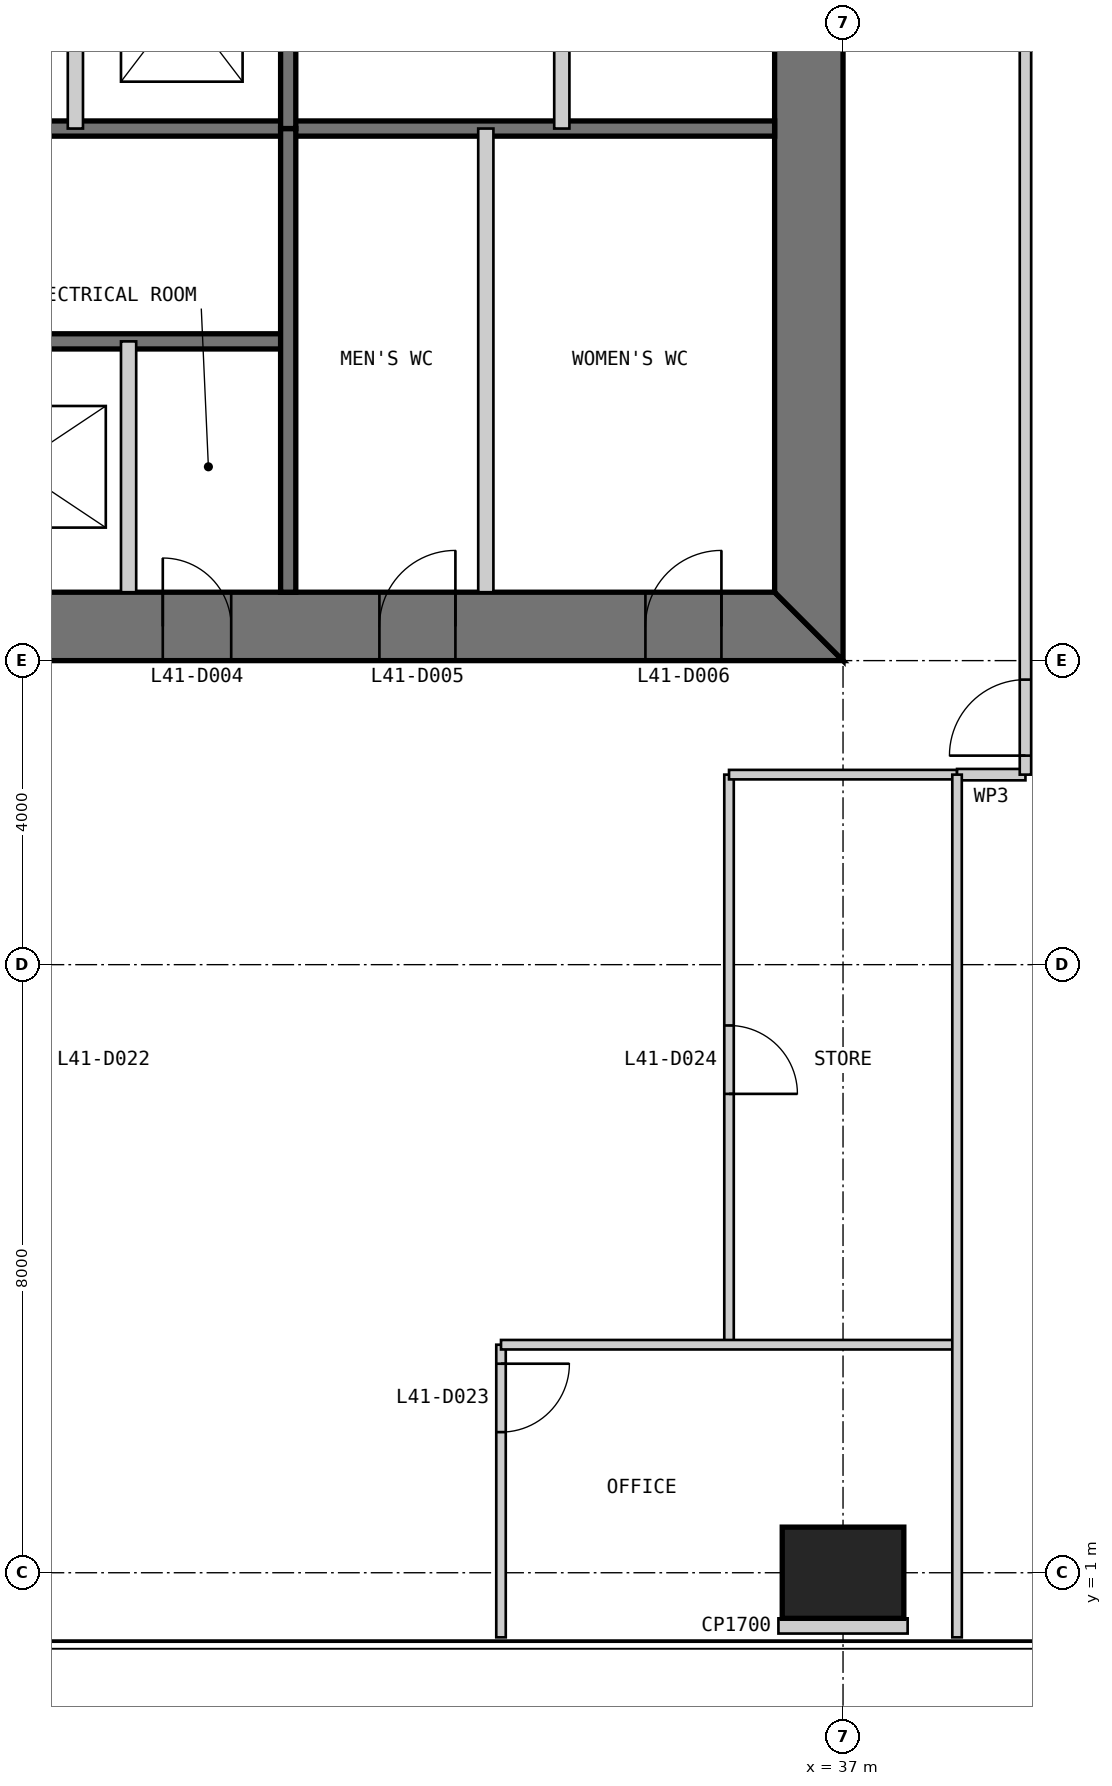
"""IFC4 building model, lengths in metres.
Left out: names, types, materials, properties, quantities, classifications, styles, units other than length and angle.
Written with IfcOpenShell. Run it as: python <this file> out.ifc"""

import sys

from ifc_helpers import new_model, si_unit, direction, frame, frame_2d, origin, origin_2d, place, context, subcontext, project, spatial, polyline, rectangle, outline, extrude, element, fill, save


model = new_model("IFC4")
c1 = context("Model", 3, precision=1e-05, world=origin(), true_north=direction((0.0, 1.0)))
c2 = subcontext(c1, "Body", "Model", "MODEL_VIEW")
j1 = project(units=[si_unit("LENGTHUNIT", "METRE"), si_unit("PLANEANGLEUNIT", "RADIAN")], contexts=[c1])
p1 = place(None, origin())
s1 = spatial("IfcSite", under=j1, at=p1, CompositionType="ELEMENT")
p2 = place(p1, origin())
s2 = spatial("IfcBuilding", under=s1, at=p2, CompositionType="ELEMENT")
p3 = place(p2, frame((0.0, 0.0, 177.8)))
s3 = spatial("IfcBuildingStorey", under=s2, at=p3, CompositionType="ELEMENT", Elevation=177.8)
p4 = place(p3, frame((37.0, 1.0, 0.0), z_axis=(0.0, 0.0, 1.0), x_axis=(1.0, 0.0, 0.0)))
e1 = element("IfcColumn", 1, at=p4, inside=s3, PredefinedType="COLUMN", context=c2, shape_type="SweptSolid", body=[
    extrude(rectangle(XDim=1.6, YDim=1.2, at=origin_2d()), origin(), (0.0, 0.0, 1.0), 4.0),
])
p5 = place(p3, frame((13.0, 13.45, 0.0), z_axis=(0.0, 0.0, 1.0), x_axis=(1.0, 0.0, 0.0)))
e2 = element("IfcWall", 2, at=p5, inside=s3, PredefinedType="SHEAR", context=c2, shape_type="SweptSolid", body=[
    extrude(outline(polyline([(0.0, -0.45), (24.0, -0.45), (23.1, 0.45), (0.9, 0.45), (0.0, -0.45)])), origin(), (0.0, 0.0, 1.0), 4.0),
])
p6 = place(p5, frame((4.9, 0.0, 0.0)))
e3 = element("IfcOpeningElement", 3, at=p6, cuts=e2, PredefinedType="OPENING", context=c2, shape_type="SweptSolid", body=[
    extrude(rectangle(XDim=1.0, YDim=2.2, at=frame_2d((0.5, 1.1))), frame((0.0, 0.46, 0.0), z_axis=(0.0, -1.0, 0.0), x_axis=(1.0, 0.0, 0.0)), (0.0, 0.0, 1.0), 0.92),
])
p7 = place(p5, frame((8.9, 0.0, 0.0)))
e4 = element("IfcOpeningElement", 4, at=p7, cuts=e2, PredefinedType="OPENING", context=c2, shape_type="SweptSolid", body=[
    extrude(rectangle(XDim=1.1, YDim=2.2, at=frame_2d((0.55, 1.1))), frame((0.0, 0.46, 0.0), z_axis=(0.0, -1.0, 0.0), x_axis=(1.0, 0.0, 0.0)), (0.0, 0.0, 1.0), 0.92),
])
p8 = place(p5, frame((15.05, 0.0, 0.0)))
e5 = element("IfcOpeningElement", 5, at=p8, cuts=e2, PredefinedType="OPENING", context=c2, shape_type="SweptSolid", body=[
    extrude(rectangle(XDim=0.9, YDim=2.2, at=frame_2d((0.45, 1.1))), frame((0.0, 0.46, 0.0), z_axis=(0.0, -1.0, 0.0), x_axis=(1.0, 0.0, 0.0)), (0.0, 0.0, 1.0), 0.92),
])
p9 = place(p5, frame((17.9, 0.0, 0.0)))
e6 = element("IfcOpeningElement", 6, at=p9, cuts=e2, PredefinedType="OPENING", context=c2, shape_type="SweptSolid", body=[
    extrude(rectangle(XDim=1.0, YDim=2.2, at=frame_2d((0.5, 1.1))), frame((0.0, 0.46, 0.0), z_axis=(0.0, -1.0, 0.0), x_axis=(1.0, 0.0, 0.0)), (0.0, 0.0, 1.0), 0.92),
])
p10 = place(p5, frame((21.4, 0.0, 0.0)))
e7 = element("IfcOpeningElement", 7, at=p10, cuts=e2, PredefinedType="OPENING", context=c2, shape_type="SweptSolid", body=[
    extrude(rectangle(XDim=1.0, YDim=2.2, at=frame_2d((0.5, 1.1))), frame((0.0, 0.46, 0.0), z_axis=(0.0, -1.0, 0.0), x_axis=(1.0, 0.0, 0.0)), (0.0, 0.0, 1.0), 0.92),
])
p11 = place(p3, frame((36.55, 13.9, 0.0), z_axis=(0.0, 0.0, 1.0), x_axis=(0.0, 1.0, 0.0)))
e8 = element("IfcWall", 8, at=p11, inside=s3, PredefinedType="SHEAR", context=c2, shape_type="SweptSolid", body=[
    extrude(outline(polyline([(-0.9, -0.45), (23.1, -0.45), (22.2, 0.45), (0.0, 0.45), (-0.9, -0.45)])), origin(), (0.0, 0.0, 1.0), 4.0),
])
p12 = place(p11, frame((20.2, 0.0, 0.0)))
e9 = element("IfcOpeningElement", 9, at=p12, cuts=e8, PredefinedType="OPENING", context=c2, shape_type="SweptSolid", body=[
    extrude(rectangle(XDim=1.0, YDim=2.2, at=frame_2d((0.5, 1.1))), frame((0.0, 0.46, 0.0), z_axis=(0.0, -1.0, 0.0), x_axis=(1.0, 0.0, 0.0)), (0.0, 0.0, 1.0), 0.92),
])
p13 = place(p11, frame((17.25, 0.0, 0.0)))
e10 = element("IfcOpeningElement", 10, at=p13, cuts=e8, PredefinedType="OPENING", context=c2, shape_type="SweptSolid", body=[
    extrude(rectangle(XDim=0.9, YDim=2.2, at=frame_2d((0.45, 1.1))), frame((0.0, 0.46, 0.0), z_axis=(0.0, -1.0, 0.0), x_axis=(1.0, 0.0, 0.0)), (0.0, 0.0, 1.0), 0.92),
])
p14 = place(p3, frame((20.3, 17.2, 0.0), z_axis=(0.0, 0.0, 1.0), x_axis=(1.0, 0.0, 0.0)))
e11 = element("IfcWall", 11, at=p14, inside=s3, PredefinedType="SOLIDWALL", context=c2, shape_type="SweptSolid", body=[
    extrude(rectangle(XDim=9.4, YDim=0.2, at=frame_2d((4.7, 0.0))), origin(), (0.0, 0.0, 1.0), 3.8),
])
p15 = place(p14, frame((0.25, 0.0, 0.0)))
e12 = element("IfcOpeningElement", 12, at=p15, cuts=e11, PredefinedType="OPENING", context=c2, shape_type="SweptSolid", body=[
    extrude(rectangle(XDim=1.0, YDim=2.2, at=frame_2d((0.5, 1.1))), frame((0.0, 0.11, 0.0), z_axis=(0.0, -1.0, 0.0), x_axis=(1.0, 0.0, 0.0)), (0.0, 0.0, 1.0), 0.22),
])
p16 = place(p3, frame((20.3, 20.0, 0.0), z_axis=(0.0, 0.0, 1.0), x_axis=(1.0, 0.0, 0.0)))
e13 = element("IfcWall", 13, at=p16, inside=s3, PredefinedType="SOLIDWALL", context=c2, shape_type="SweptSolid", body=[
    extrude(rectangle(XDim=15.8, YDim=0.2, at=frame_2d((7.9, 0.0))), origin(), (0.0, 0.0, 1.0), 3.8),
])
p17 = place(p3, frame((27.6, 13.9, 0.0), z_axis=(0.0, 0.0, 1.0), x_axis=(0.0, 1.0, 0.0)))
e14 = element("IfcWall", 14, at=p17, inside=s3, PredefinedType="PARTITIONING", context=c2, shape_type="SweptSolid", body=[
    extrude(rectangle(XDim=3.3, YDim=0.2, at=frame_2d((1.65, 0.0))), origin(), (0.0, 0.0, 1.0), 3.8),
])
p18 = place(p3, frame((29.7, 13.9, 0.0), z_axis=(0.0, 0.0, 1.0), x_axis=(0.0, 1.0, 0.0)))
e15 = element("IfcWall", 15, at=p18, inside=s3, PredefinedType="SOLIDWALL", context=c2, shape_type="SweptSolid", body=[
    extrude(rectangle(XDim=6.1, YDim=0.2, at=frame_2d((3.05, 0.0))), origin(), (0.0, 0.0, 1.0), 3.8),
])
p19 = place(p3, frame((32.3, 13.9, 0.0), z_axis=(0.0, 0.0, 1.0), x_axis=(0.0, 1.0, 0.0)))
e16 = element("IfcWall", 16, at=p19, inside=s3, PredefinedType="PARTITIONING", context=c2, shape_type="SweptSolid", body=[
    extrude(rectangle(XDim=6.1, YDim=0.2, at=frame_2d((3.05, 0.0))), origin(), (0.0, 0.0, 1.0), 3.8),
])
p20 = place(p3, frame((33.3, 36.1, 0.0), z_axis=(0.0, 0.0, 1.0), x_axis=(0.0, -1.0, 0.0)))
e17 = element("IfcWall", 17, at=p20, inside=s3, PredefinedType="PARTITIONING", context=c2, shape_type="SweptSolid", body=[
    extrude(rectangle(XDim=16.1, YDim=0.2, at=frame_2d((8.05, 0.0))), origin(), (0.0, 0.0, 1.0), 3.8),
])
p21 = place(p20, frame((3.8, 0.0, 0.0)))
e18 = element("IfcOpeningElement", 18, at=p21, cuts=e17, PredefinedType="OPENING", context=c2, shape_type="SweptSolid", body=[
    extrude(rectangle(XDim=0.9, YDim=2.2, at=frame_2d((0.45, 1.1))), frame((0.0, 0.11, 0.0), z_axis=(0.0, -1.0, 0.0), x_axis=(1.0, 0.0, 0.0)), (0.0, 0.0, 1.0), 0.22),
])
p22 = place(p3, frame((29.7, 36.1, 0.0), z_axis=(0.0, 0.0, 1.0), x_axis=(0.0, -1.0, 0.0)))
e19 = element("IfcWall", 19, at=p22, inside=s3, PredefinedType="SOLIDWALL", context=c2, shape_type="SweptSolid", body=[
    extrude(rectangle(XDim=16.1, YDim=0.2, at=frame_2d((8.05, 0.0))), origin(), (0.0, 0.0, 1.0), 3.8),
])
p23 = place(p22, frame((7.217, 0.0, 0.0)))
e20 = element("IfcOpeningElement", 20, at=p23, cuts=e19, PredefinedType="OPENING", context=c2, shape_type="SweptSolid", body=[
    extrude(rectangle(XDim=1.1, YDim=2.2, at=frame_2d((0.55, 1.1))), frame((0.0, 0.11, 0.0), z_axis=(0.0, -1.0, 0.0), x_axis=(1.0, 0.0, 0.0)), (0.0, 0.0, 1.0), 0.22),
])
p24 = place(p22, frame((10.55, 0.0, 0.0)))
e21 = element("IfcOpeningElement", 21, at=p24, cuts=e19, PredefinedType="OPENING", context=c2, shape_type="SweptSolid", body=[
    extrude(rectangle(XDim=1.1, YDim=2.2, at=frame_2d((0.55, 1.1))), frame((0.0, 0.11, 0.0), z_axis=(0.0, -1.0, 0.0), x_axis=(1.0, 0.0, 0.0)), (0.0, 0.0, 1.0), 0.22),
])
p25 = place(p22, frame((13.883, 0.0, 0.0)))
e22 = element("IfcOpeningElement", 22, at=p25, cuts=e19, PredefinedType="OPENING", context=c2, shape_type="SweptSolid", body=[
    extrude(rectangle(XDim=1.1, YDim=2.2, at=frame_2d((0.55, 1.1))), frame((0.0, 0.11, 0.0), z_axis=(0.0, -1.0, 0.0), x_axis=(1.0, 0.0, 0.0)), (0.0, 0.0, 1.0), 0.22),
])
p26 = place(p3, frame((26.9, 30.0, 0.0), z_axis=(0.0, 0.0, 1.0), x_axis=(0.0, -1.0, 0.0)))
e23 = element("IfcWall", 23, at=p26, inside=s3, PredefinedType="PARTITIONING", context=c2, shape_type="SweptSolid", body=[
    extrude(rectangle(XDim=10.0, YDim=0.2, at=frame_2d((5.0, 0.0))), origin(), (0.0, 0.0, 1.0), 3.8),
])
p27 = place(p3, frame((32.5, 0.15, 0.0), z_axis=(0.0, 0.0, 1.0), x_axis=(0.0, 1.0, 0.0)))
e24 = element("IfcWall", 24, at=p27, inside=s3, PredefinedType="PARTITIONING", context=c2, shape_type="SweptSolid", body=[
    extrude(rectangle(XDim=3.85, YDim=0.125, at=frame_2d((1.925, 0.0))), origin(), (0.0, 0.0, 1.0), 3.85),
])
p28 = place(p27, frame((2.7, 0.0, 0.0)))
e25 = element("IfcOpeningElement", 25, at=p28, cuts=e24, PredefinedType="OPENING", context=c2, shape_type="SweptSolid", body=[
    extrude(rectangle(XDim=0.9, YDim=2.2, at=frame_2d((0.45, 1.1))), frame((0.0, 0.073, 0.0), z_axis=(0.0, -1.0, 0.0), x_axis=(1.0, 0.0, 0.0)), (0.0, 0.0, 1.0), 0.145),
])
p29 = place(p3, frame((35.5, 4.0, 0.0), z_axis=(0.0, 0.0, 1.0), x_axis=(0.0, 1.0, 0.0)))
e26 = element("IfcWall", 26, at=p29, inside=s3, PredefinedType="PARTITIONING", context=c2, shape_type="SweptSolid", body=[
    extrude(rectangle(XDim=7.5, YDim=0.125, at=frame_2d((3.75, 0.0))), origin(), (0.0, 0.0, 1.0), 3.85),
])
p30 = place(p29, frame((3.3, 0.0, 0.0)))
e27 = element("IfcOpeningElement", 27, at=p30, cuts=e26, PredefinedType="OPENING", context=c2, shape_type="SweptSolid", body=[
    extrude(rectangle(XDim=0.9, YDim=2.2, at=frame_2d((0.45, 1.1))), frame((0.0, 0.073, 0.0), z_axis=(0.0, -1.0, 0.0), x_axis=(1.0, 0.0, 0.0)), (0.0, 0.0, 1.0), 0.145),
])
p31 = place(p3, frame((32.5, 4.0, 0.0), z_axis=(0.0, 0.0, 1.0), x_axis=(1.0, 0.0, 0.0)))
e28 = element("IfcWall", 28, at=p31, inside=s3, PredefinedType="PARTITIONING", context=c2, shape_type="SweptSolid", body=[
    extrude(rectangle(XDim=6.0, YDim=0.125, at=frame_2d((3.0, 0.0))), origin(), (0.0, 0.0, 1.0), 3.85),
])
p32 = place(p3, frame((35.5, 11.5, 0.0), z_axis=(0.0, 0.0, 1.0), x_axis=(1.0, 0.0, 0.0)))
e29 = element("IfcWall", 29, at=p32, inside=s3, PredefinedType="PARTITIONING", context=c2, shape_type="SweptSolid", body=[
    extrude(rectangle(XDim=3.0, YDim=0.125, at=frame_2d((1.5, 0.0))), origin(), (0.0, 0.0, 1.0), 3.85),
])
p33 = place(p3, frame((38.5, 11.5, 0.0), z_axis=(0.0, 0.0, 1.0), x_axis=(1.0, 0.0, 0.0)))
e30 = element("IfcWall", 30, at=p33, inside=s3, PredefinedType="PARTITIONING", context=c2, shape_type="SweptSolid", body=[
    extrude(rectangle(XDim=0.9, YDim=0.15, at=frame_2d((0.45, 0.0))), origin(), (0.0, 0.0, 1.0), 3.85),
])
p34 = place(p3, frame((39.4, 11.5, 0.0), z_axis=(0.0, 0.0, 1.0), x_axis=(0.0, 1.0, 0.0)))
e31 = element("IfcWall", 31, at=p34, inside=s3, PredefinedType="PARTITIONING", context=c2, shape_type="SweptSolid", body=[
    extrude(rectangle(XDim=27.0, YDim=0.15, at=frame_2d((13.5, 0.0))), origin(), (0.0, 0.0, 1.0), 3.85),
])
p35 = place(p34, frame((16.0, 0.0, 0.0)))
e32 = element("IfcOpeningElement", 32, at=p35, cuts=e31, PredefinedType="OPENING", context=c2, shape_type="SweptSolid", body=[
    extrude(rectangle(XDim=1.0, YDim=2.2, at=frame_2d((0.5, 1.1))), frame((0.0, 0.085, 0.0), z_axis=(0.0, -1.0, 0.0), x_axis=(1.0, 0.0, 0.0)), (0.0, 0.0, 1.0), 0.17),
])
p36 = place(p34, frame((0.25, 0.0, 0.0)))
e33 = element("IfcOpeningElement", 33, at=p36, cuts=e31, PredefinedType="OPENING", context=c2, shape_type="SweptSolid", body=[
    extrude(rectangle(XDim=1.0, YDim=2.2, at=frame_2d((0.5, 1.1))), frame((0.0, 0.085, 0.0), z_axis=(0.0, -1.0, 0.0), x_axis=(1.0, 0.0, 0.0)), (0.0, 0.0, 1.0), 0.17),
])
p37 = place(p34, frame((10.75, 0.0, 0.0)))
e34 = element("IfcOpeningElement", 34, at=p37, cuts=e31, PredefinedType="OPENING", context=c2, shape_type="SweptSolid", body=[
    extrude(rectangle(XDim=1.0, YDim=2.2, at=frame_2d((0.5, 1.1))), frame((0.0, 0.085, 0.0), z_axis=(0.0, -1.0, 0.0), x_axis=(1.0, 0.0, 0.0)), (0.0, 0.0, 1.0), 0.17),
])
p38 = place(p34, frame((22.0, 0.0, 0.0)))
e35 = element("IfcOpeningElement", 35, at=p38, cuts=e31, PredefinedType="OPENING", context=c2, shape_type="SweptSolid", body=[
    extrude(rectangle(XDim=1.0, YDim=2.2, at=frame_2d((0.5, 1.1))), frame((0.0, 0.085, 0.0), z_axis=(0.0, -1.0, 0.0), x_axis=(1.0, 0.0, 0.0)), (0.0, 0.0, 1.0), 0.17),
])
p39 = place(p34, frame((25.0, 0.0, 0.0)))
e36 = element("IfcOpeningElement", 36, at=p39, cuts=e31, PredefinedType="OPENING", context=c2, shape_type="SweptSolid", body=[
    extrude(rectangle(XDim=1.0, YDim=2.2, at=frame_2d((0.5, 1.1))), frame((0.0, 0.085, 0.0), z_axis=(0.0, -1.0, 0.0), x_axis=(1.0, 0.0, 0.0)), (0.0, 0.0, 1.0), 0.17),
])
p40 = place(p3, frame((38.5, 0.15, 0.0), z_axis=(0.0, 0.0, 1.0), x_axis=(0.0, 1.0, 0.0)))
e37 = element("IfcWall", 37, at=p40, inside=s3, PredefinedType="PARTITIONING", context=c2, shape_type="SweptSolid", body=[
    extrude(rectangle(XDim=11.35, YDim=0.125, at=frame_2d((5.675, 0.0))), origin(), (0.0, 0.0, 1.0), 3.85),
])
p41 = place(p3, frame((37.0, 0.2, 0.0), z_axis=(0.0, 0.0, 1.0), x_axis=(0.0, 1.0, 0.0)))
e38 = element("IfcWall", 38, at=p41, inside=s3, PredefinedType="PARTITIONING", context=c2, shape_type="SweptSolid", body=[
    extrude(rectangle(XDim=0.2, YDim=1.7, at=frame_2d((0.1, 0.0))), origin(), (0.0, 0.0, 1.0), 3.85),
])
p42 = place(p8, origin())
e39 = element("IfcDoor", 39, at=p42, inside=s3, OperationType="SINGLE_SWING_LEFT", PredefinedType="DOOR", context=c2, shape_type="SweptSolid", body=[
    extrude(rectangle(XDim=0.9, YDim=2.2, at=frame_2d((0.45, 1.1))), frame((0.0, 0.025, 0.0), z_axis=(0.0, -1.0, 0.0), x_axis=(1.0, 0.0, 0.0)), (0.0, 0.0, 1.0), 0.05),
    extrude(outline(polyline([(0.0, 0.0), (0.04, 0.0), (0.04, 2.16), (0.86, 2.16), (0.86, 0.0), (0.9, 0.0), (0.9, 2.2), (0.0, 2.2), (0.0, 0.0)])), frame((0.0, 0.3, 0.0), z_axis=(0.0, -1.0, 0.0), x_axis=(1.0, 0.0, 0.0)), (0.0, 0.0, 1.0), 0.6),
])
fill(e5, e39)
p43 = place(p9, origin())
e40 = element("IfcDoor", 40, at=p43, inside=s3, OperationType="SINGLE_SWING_RIGHT", PredefinedType="DOOR", context=c2, shape_type="SweptSolid", body=[
    extrude(rectangle(XDim=1.0, YDim=2.2, at=frame_2d((0.5, 1.1))), frame((0.0, 0.025, 0.0), z_axis=(0.0, -1.0, 0.0), x_axis=(1.0, 0.0, 0.0)), (0.0, 0.0, 1.0), 0.05),
    extrude(outline(polyline([(0.0, 0.0), (0.04, 0.0), (0.04, 2.16), (0.96, 2.16), (0.96, 0.0), (1.0, 0.0), (1.0, 2.2), (0.0, 2.2), (0.0, 0.0)])), frame((0.0, 0.3, 0.0), z_axis=(0.0, -1.0, 0.0), x_axis=(1.0, 0.0, 0.0)), (0.0, 0.0, 1.0), 0.6),
])
fill(e6, e40)
p44 = place(p10, origin())
e41 = element("IfcDoor", 41, at=p44, inside=s3, OperationType="SINGLE_SWING_RIGHT", PredefinedType="DOOR", context=c2, shape_type="SweptSolid", body=[
    extrude(rectangle(XDim=1.0, YDim=2.2, at=frame_2d((0.5, 1.1))), frame((0.0, 0.025, 0.0), z_axis=(0.0, -1.0, 0.0), x_axis=(1.0, 0.0, 0.0)), (0.0, 0.0, 1.0), 0.05),
    extrude(outline(polyline([(0.0, 0.0), (0.04, 0.0), (0.04, 2.16), (0.96, 2.16), (0.96, 0.0), (1.0, 0.0), (1.0, 2.2), (0.0, 2.2), (0.0, 0.0)])), frame((0.0, 0.3, 0.0), z_axis=(0.0, -1.0, 0.0), x_axis=(1.0, 0.0, 0.0)), (0.0, 0.0, 1.0), 0.6),
])
fill(e7, e41)
p45 = place(p28, frame((0.9, 0.0, 0.0), z_axis=(0.0, 0.0, 1.0), x_axis=(-1.0, 0.0, 0.0)))
e42 = element("IfcDoor", 42, at=p45, inside=s3, OperationType="SINGLE_SWING_LEFT", PredefinedType="DOOR", context=c2, shape_type="SweptSolid", body=[
    extrude(rectangle(XDim=0.9, YDim=2.2, at=frame_2d((0.45, 1.1))), frame((0.0, 0.025, 0.0), z_axis=(0.0, -1.0, 0.0), x_axis=(1.0, 0.0, 0.0)), (0.0, 0.0, 1.0), 0.05),
])
fill(e25, e42)
p46 = place(p30, frame((0.9, 0.0, 0.0), z_axis=(0.0, 0.0, 1.0), x_axis=(-1.0, 0.0, 0.0)))
e43 = element("IfcDoor", 43, at=p46, inside=s3, OperationType="SINGLE_SWING_RIGHT", PredefinedType="DOOR", context=c2, shape_type="SweptSolid", body=[
    extrude(rectangle(XDim=0.9, YDim=2.2, at=frame_2d((0.45, 1.1))), frame((0.0, 0.025, 0.0), z_axis=(0.0, -1.0, 0.0), x_axis=(1.0, 0.0, 0.0)), (0.0, 0.0, 1.0), 0.05),
])
fill(e27, e43)
p47 = place(p36, origin())
e44 = element("IfcDoor", 44, at=p47, inside=s3, OperationType="SINGLE_SWING_LEFT", PredefinedType="DOOR", context=c2, shape_type="SweptSolid", body=[
    extrude(rectangle(XDim=1.0, YDim=2.2, at=frame_2d((0.5, 1.1))), frame((0.0, 0.025, 0.0), z_axis=(0.0, -1.0, 0.0), x_axis=(1.0, 0.0, 0.0)), (0.0, 0.0, 1.0), 0.05),
])
fill(e33, e44)
save(model, sys.argv[1])
